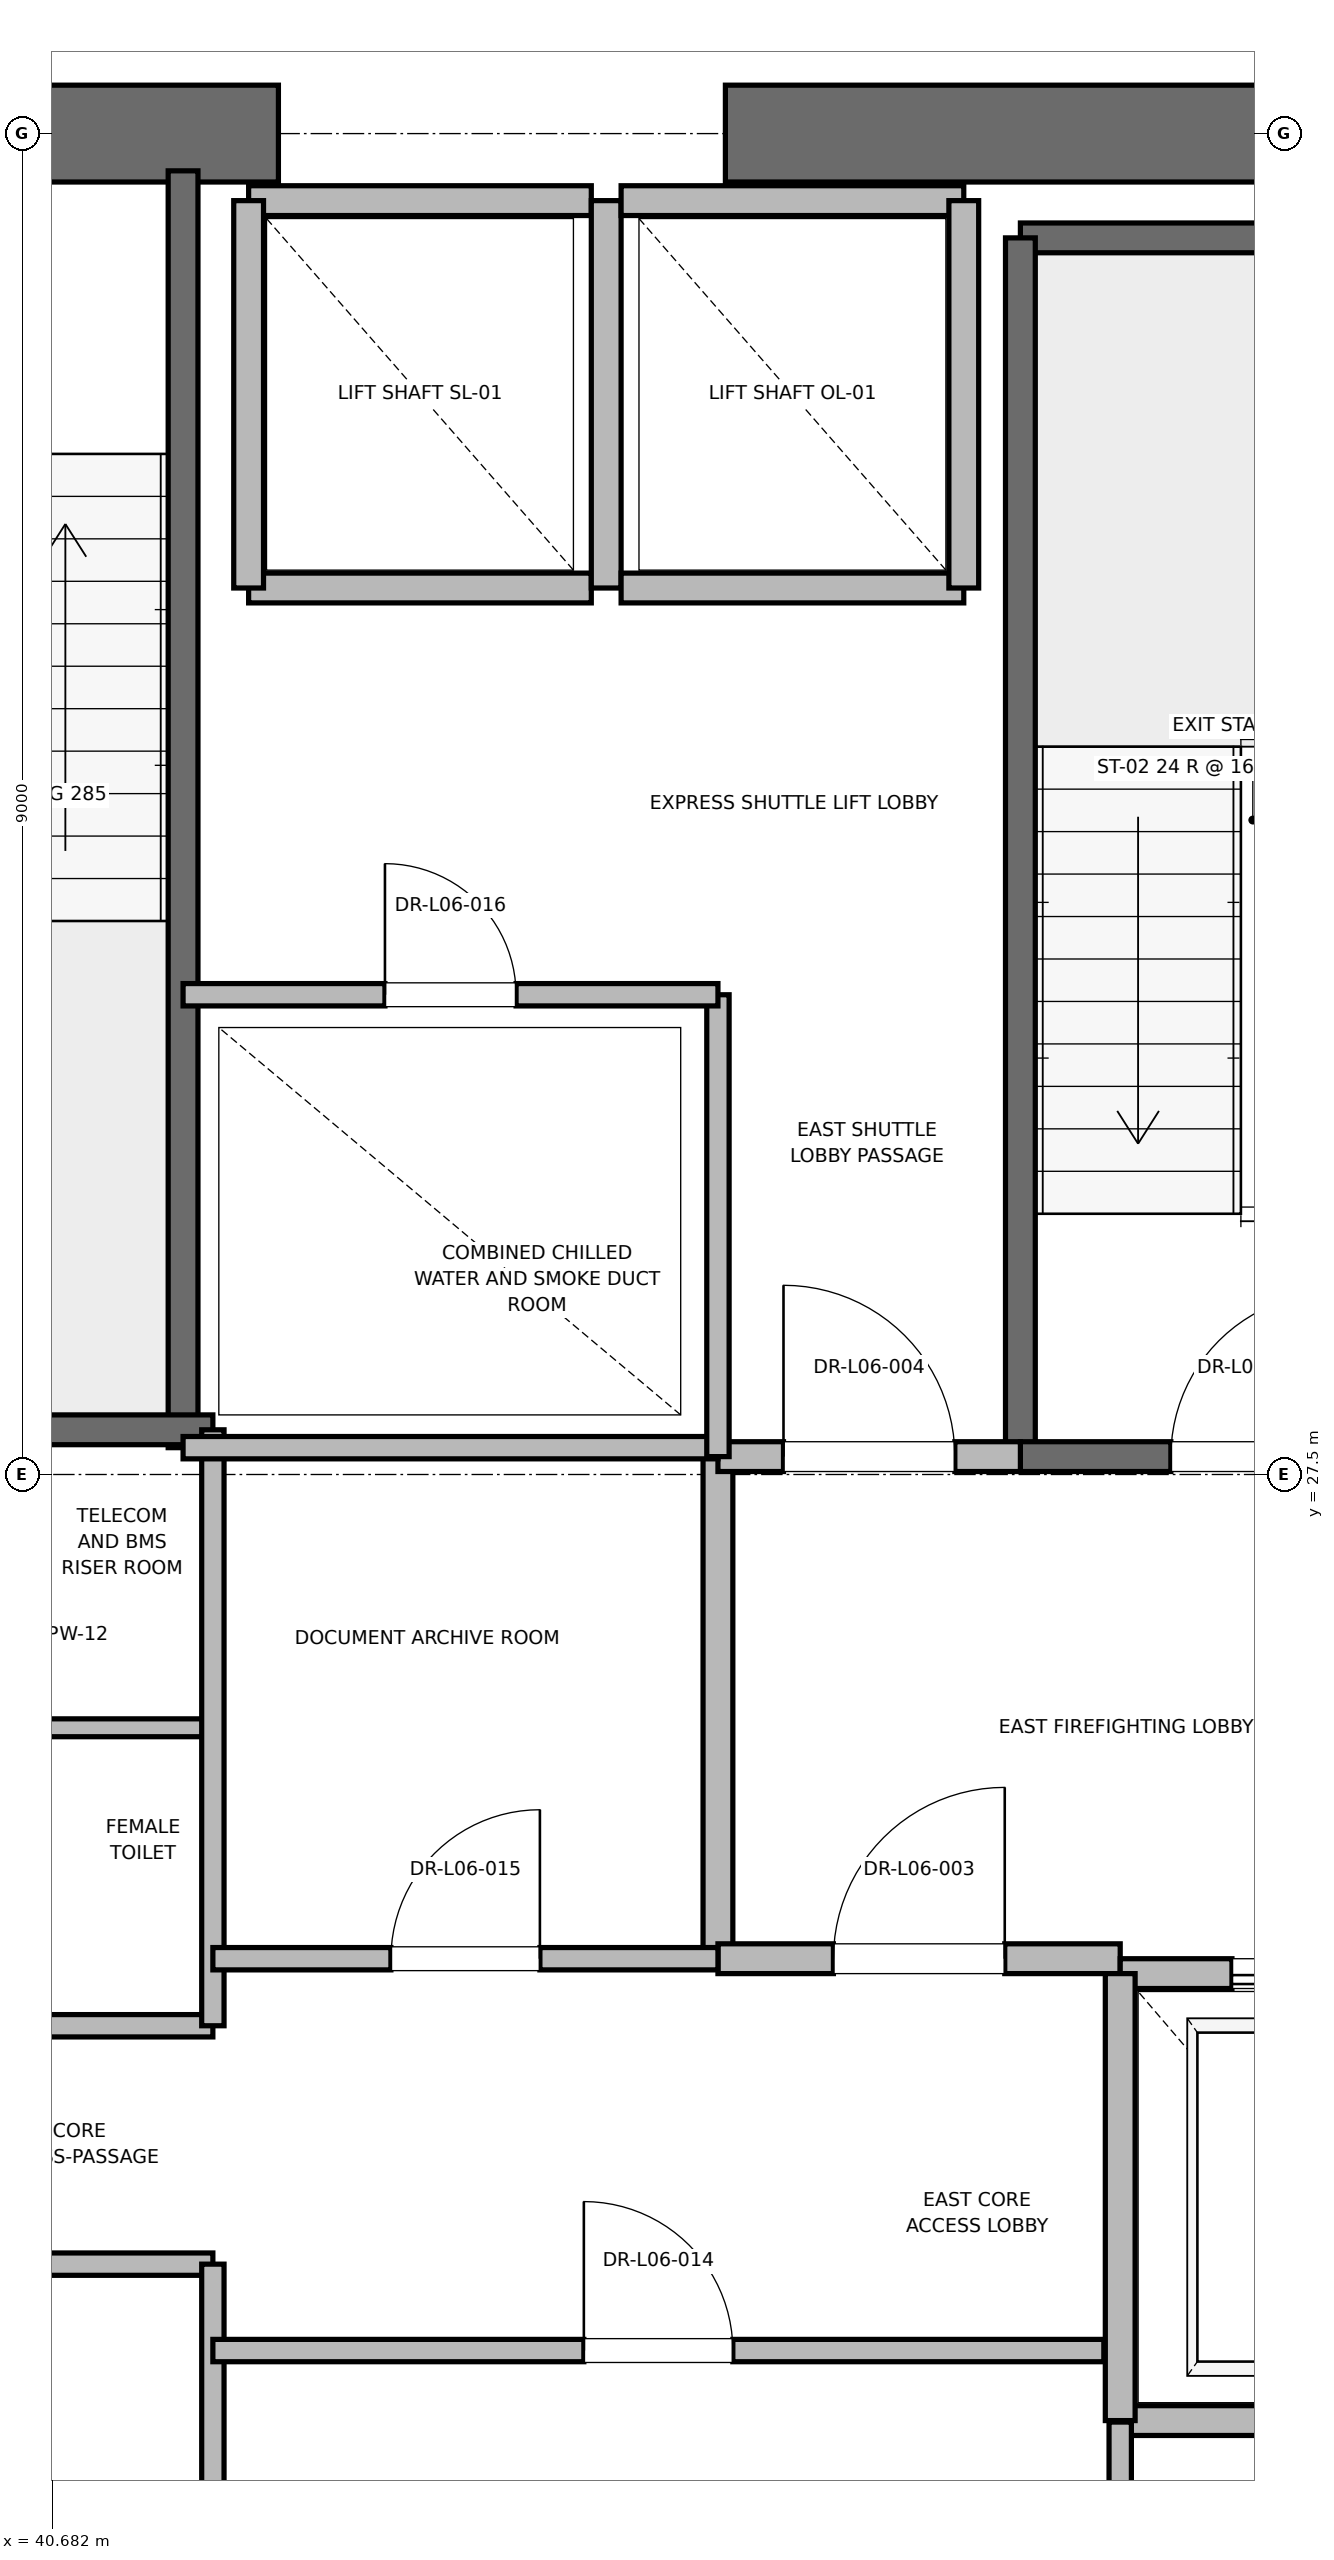
"""IFC4 building model, lengths in metres.
Left out: names, types, materials, properties, quantities, classifications, styles, units other than length and angle.
Written with IfcOpenShell. Run it as: python <this file> out.ifc"""

import sys

from ifc_helpers import new_model, si_unit, direction, frame, frame_2d, origin, place, context, subcontext, project, spatial, rectangle, extrude, element, fill, save


model = new_model("IFC4")
c1 = context("Model", 3, precision=1e-05, world=origin(), true_north=direction((0.0, 1.0)))
c2 = subcontext(c1, "Body", "Model", "MODEL_VIEW")
j1 = project(units=[si_unit("LENGTHUNIT", "METRE"), si_unit("PLANEANGLEUNIT", "RADIAN")], contexts=[c1])
p1 = place(None, origin())
s1 = spatial("IfcSite", under=j1, at=p1, CompositionType="ELEMENT")
p2 = place(p1, origin())
s2 = spatial("IfcBuilding", under=s1, at=p2, CompositionType="ELEMENT")
p3 = place(p2, frame((0.0, 0.0, 31.6)))
s3 = spatial("IfcBuildingStorey", under=s2, at=p3, CompositionType="ELEMENT", Elevation=31.6)
p4 = place(p3, frame((37.8, 36.5, 0.0), z_axis=(0.0, 0.0, 1.0), x_axis=(1.0, 0.0, 0.0)))
e1 = element("IfcWall", 1, at=p4, inside=s3, PredefinedType="SHEAR", context=c2, shape_type="SweptSolid", body=[
    extrude(rectangle(XDim=4.4, YDim=0.65, at=frame_2d((2.2, 0.0))), origin(), (0.0, 0.0, 1.0), 3.76),
])
p5 = place(p4, frame((1.65, 0.0, 0.0)))
e2 = element("IfcOpeningElement", 2, at=p5, cuts=e1, PredefinedType="OPENING", context=c2, shape_type="SweptSolid", body=[
    extrude(rectangle(XDim=1.1, YDim=2.15, at=frame_2d((0.55, 1.075))), frame((0.0, 0.325, 0.0), z_axis=(0.0, -1.0, 0.0), x_axis=(1.0, 0.0, 0.0)), (0.0, 0.0, 1.0), 0.65),
])
p6 = place(p3, frame((45.2, 36.5, 0.0), z_axis=(0.0, 0.0, 1.0), x_axis=(1.0, 0.0, 0.0)))
e3 = element("IfcWall", 3, at=p6, inside=s3, PredefinedType="SHEAR", context=c2, shape_type="SweptSolid", body=[
    extrude(rectangle(XDim=5.8, YDim=0.65, at=frame_2d((2.9, 0.0))), origin(), (0.0, 0.0, 1.0), 3.76),
])
p7 = place(p3, frame((47.18, 35.8, 0.0), z_axis=(0.0, 0.0, 1.0), x_axis=(1.0, 0.0, 0.0)))
e4 = element("IfcWall", 4, at=p7, inside=s3, PredefinedType="SOLIDWALL", context=c2, shape_type="SweptSolid", body=[
    extrude(rectangle(XDim=3.12, YDim=0.2, at=frame_2d((1.56, 0.0))), origin(), (0.0, 0.0, 1.0), 3.76),
])
p8 = place(p3, frame((47.18, 27.62, 0.0), z_axis=(0.0, 0.0, 1.0), x_axis=(0.0, 1.0, 0.0)))
e5 = element("IfcWall", 5, at=p8, inside=s3, PredefinedType="SOLIDWALL", context=c2, shape_type="SweptSolid", body=[
    extrude(rectangle(XDim=8.18, YDim=0.2, at=frame_2d((4.09, 0.0))), origin(), (0.0, 0.0, 1.0), 3.76),
])
p9 = place(p3, frame((47.18, 27.62, 0.0), z_axis=(0.0, 0.0, 1.0), x_axis=(1.0, 0.0, 0.0)))
e6 = element("IfcWall", 6, at=p9, inside=s3, PredefinedType="SOLIDWALL", context=c2, shape_type="SweptSolid", body=[
    extrude(rectangle(XDim=3.12, YDim=0.2, at=frame_2d((1.56, 0.0))), origin(), (0.0, 0.0, 1.0), 3.76),
])
p10 = place(p9, frame((1.01, 0.0, 0.0)))
e7 = element("IfcOpeningElement", 7, at=p10, cuts=e6, PredefinedType="OPENING", context=c2, shape_type="SweptSolid", body=[
    extrude(rectangle(XDim=1.1, YDim=2.15, at=frame_2d((0.55, 1.075))), frame((0.0, 0.1, 0.0), z_axis=(0.0, -1.0, 0.0), x_axis=(1.0, 0.0, 0.0)), (0.0, 0.0, 1.0), 0.2),
])
p11 = place(p3, frame((41.56, 27.68, 0.0), z_axis=(0.0, 0.0, 1.0), x_axis=(0.0, 1.0, 0.0)))
e8 = element("IfcWall", 8, at=p11, inside=s3, PredefinedType="SOLIDWALL", context=c2, shape_type="SweptSolid", body=[
    extrude(rectangle(XDim=8.57, YDim=0.2, at=frame_2d((4.285, 0.0))), origin(), (0.0, 0.0, 1.0), 3.76),
])
p12 = place(p3, frame((38.44, 27.8, 0.0), z_axis=(0.0, 0.0, 1.0), x_axis=(1.0, 0.0, 0.0)))
e9 = element("IfcWall", 9, at=p12, inside=s3, PredefinedType="SOLIDWALL", context=c2, shape_type="SweptSolid", body=[
    extrude(rectangle(XDim=3.32, YDim=0.2, at=frame_2d((1.66, 0.0))), origin(), (0.0, 0.0, 1.0), 3.76),
])
p13 = place(p3, frame((45.15, 24.25, 0.0), z_axis=(0.0, 0.0, 1.0), x_axis=(0.0, 1.0, 0.0)))
e10 = element("IfcWall", 10, at=p13, inside=s3, PredefinedType="PARTITIONING", context=c2, shape_type="SweptSolid", body=[
    extrude(rectangle(XDim=3.37, YDim=0.2, at=frame_2d((1.685, 0.0))), origin(), (0.0, 0.0, 1.0), 3.76),
])
p14 = place(p3, frame((45.15, 24.25, 0.0), z_axis=(0.0, 0.0, 1.0), x_axis=(1.0, 0.0, 0.0)))
e11 = element("IfcWall", 11, at=p14, inside=s3, PredefinedType="PARTITIONING", context=c2, shape_type="SweptSolid", body=[
    extrude(rectangle(XDim=2.7, YDim=0.2, at=frame_2d((1.35, 0.0))), origin(), (0.0, 0.0, 1.0), 3.76),
])
p15 = place(p14, frame((0.775, 0.0, 0.0)))
e12 = element("IfcOpeningElement", 12, at=p15, cuts=e11, PredefinedType="OPENING", context=c2, shape_type="SweptSolid", body=[
    extrude(rectangle(XDim=1.15, YDim=2.2, at=frame_2d((0.575, 1.1))), frame((0.0, 0.1, 0.0), z_axis=(0.0, -1.0, 0.0), x_axis=(1.0, 0.0, 0.0)), (0.0, 0.0, 1.0), 0.2),
])
p16 = place(p3, frame((45.15, 27.62, 0.0), z_axis=(0.0, 0.0, 1.0), x_axis=(1.0, 0.0, 0.0)))
e13 = element("IfcWall", 13, at=p16, inside=s3, PredefinedType="PARTITIONING", context=c2, shape_type="SweptSolid", body=[
    extrude(rectangle(XDim=2.03, YDim=0.2, at=frame_2d((1.015, 0.0))), origin(), (0.0, 0.0, 1.0), 3.76),
])
p17 = place(p16, frame((0.44, 0.0, 0.0)))
e14 = element("IfcOpeningElement", 14, at=p17, cuts=e13, PredefinedType="OPENING", context=c2, shape_type="SweptSolid", body=[
    extrude(rectangle(XDim=1.15, YDim=2.2, at=frame_2d((0.575, 1.1))), frame((0.0, 0.1, 0.0), z_axis=(0.0, -1.0, 0.0), x_axis=(1.0, 0.0, 0.0)), (0.0, 0.0, 1.0), 0.2),
])
p18 = place(p3, frame((47.85, 21.15, 0.0), z_axis=(0.0, 0.0, 1.0), x_axis=(1.0, 0.0, 0.0)))
e15 = element("IfcWall", 15, at=p18, inside=s3, PredefinedType="SOLIDWALL", context=c2, shape_type="SweptSolid", body=[
    extrude(rectangle(XDim=2.6, YDim=0.2, at=frame_2d((1.3, 0.0))), origin(), (0.0, 0.0, 1.0), 3.76),
])
p19 = place(p3, frame((50.45, 24.15, 0.0), z_axis=(0.0, 0.0, 1.0), x_axis=(-1.0, 0.0, 0.0)))
e16 = element("IfcWall", 16, at=p19, inside=s3, PredefinedType="SOLIDWALL", context=c2, shape_type="SweptSolid", body=[
    extrude(rectangle(XDim=2.6, YDim=0.2, at=frame_2d((1.3, 0.0))), origin(), (0.0, 0.0, 1.0), 2.54),
])
p20 = place(p19, frame((0.75, 0.0, 0.0)))
e17 = element("IfcOpeningElement", 17, at=p20, cuts=e16, PredefinedType="OPENING", context=c2, shape_type="SweptSolid", body=[
    extrude(rectangle(XDim=1.1, YDim=2.2, at=frame_2d((0.55, 1.1))), frame((0.0, 0.1, 0.0), z_axis=(0.0, -1.0, 0.0), x_axis=(1.0, 0.0, 0.0)), (0.0, 0.0, 1.0), 0.2),
])
p21 = place(p3, frame((47.85, 24.15, 0.0), z_axis=(0.0, 0.0, 1.0), x_axis=(0.0, -1.0, 0.0)))
e18 = element("IfcWall", 18, at=p21, inside=s3, PredefinedType="SOLIDWALL", context=c2, shape_type="SweptSolid", body=[
    extrude(rectangle(XDim=3.0, YDim=0.2, at=frame_2d((1.5, 0.0))), origin(), (0.0, 0.0, 1.0), 3.76),
])
p22 = place(p3, frame((42.0, 33.45, 0.0), z_axis=(0.0, 0.0, 1.0), x_axis=(1.0, 0.0, 0.0)))
e19 = element("IfcWall", 19, at=p22, inside=s3, PredefinedType="SOLIDWALL", context=c2, shape_type="SweptSolid", body=[
    extrude(rectangle(XDim=2.3, YDim=0.2, at=frame_2d((1.15, 0.0))), origin(), (0.0, 0.0, 1.0), 3.76),
])
p23 = place(p3, frame((44.3, 36.05, 0.0), z_axis=(0.0, 0.0, 1.0), x_axis=(-1.0, 0.0, 0.0)))
e20 = element("IfcWall", 20, at=p23, inside=s3, PredefinedType="SOLIDWALL", context=c2, shape_type="SweptSolid", body=[
    extrude(rectangle(XDim=2.3, YDim=0.2, at=frame_2d((1.15, 0.0))), origin(), (0.0, 0.0, 1.0), 2.54),
])
for number, where, z_axis, x_axis in (
    (21, (42.0, 36.05, 0.0), (0.0, 0.0, 1.0), (0.0, -1.0, 0.0)),
    (22, (44.4, 33.45, 0.0), (0.0, 0.0, 1.0), (0.0, 1.0, 0.0)),
):
    element("IfcWall", number, at=place(p3, frame(where, z_axis=z_axis, x_axis=x_axis)), inside=s3, PredefinedType="SOLIDWALL", context=c2, shape_type="SweptSolid", body=[
        extrude(rectangle(XDim=2.6, YDim=0.2, at=frame_2d((1.3, 0.0))), origin(), (0.0, 0.0, 1.0), 2.54),
    ])
p24 = place(p3, frame((44.5, 33.45, 0.0), z_axis=(0.0, 0.0, 1.0), x_axis=(1.0, 0.0, 0.0)))
e23 = element("IfcWall", 23, at=p24, inside=s3, PredefinedType="SOLIDWALL", context=c2, shape_type="SweptSolid", body=[
    extrude(rectangle(XDim=2.3, YDim=0.2, at=frame_2d((1.15, 0.0))), origin(), (0.0, 0.0, 1.0), 3.76),
])
p25 = place(p3, frame((46.8, 36.05, 0.0), z_axis=(0.0, 0.0, 1.0), x_axis=(-1.0, 0.0, 0.0)))
e24 = element("IfcWall", 24, at=p25, inside=s3, PredefinedType="SOLIDWALL", context=c2, shape_type="SweptSolid", body=[
    extrude(rectangle(XDim=2.3, YDim=0.2, at=frame_2d((1.15, 0.0))), origin(), (0.0, 0.0, 1.0), 2.54),
])
p26 = place(p3, frame((46.8, 33.45, 0.0), z_axis=(0.0, 0.0, 1.0), x_axis=(0.0, 1.0, 0.0)))
e25 = element("IfcWall", 25, at=p26, inside=s3, PredefinedType="SOLIDWALL", context=c2, shape_type="SweptSolid", body=[
    extrude(rectangle(XDim=2.6, YDim=0.2, at=frame_2d((1.3, 0.0))), origin(), (0.0, 0.0, 1.0), 3.76),
])
for number, where, z_axis, x_axis in (
    (26, (39.95, 22.2, 0.0), (0.0, 0.0, 1.0), (1.0, 0.0, 0.0)),
    (27, (39.95, 23.8, 0.0), (0.0, 0.0, 1.0), (1.0, 0.0, 0.0)),
):
    element("IfcWall", number, at=place(p3, frame(where, z_axis=z_axis, x_axis=x_axis)), inside=s3, PredefinedType="PARTITIONING", context=c2, shape_type="SweptSolid", body=[
        extrude(rectangle(XDim=1.81, YDim=0.15, at=frame_2d((0.905, 0.0))), origin(), (0.0, 0.0, 1.0), 2.85),
    ])
p27 = place(p3, frame((39.95, 25.8, 0.0), z_axis=(0.0, 0.0, 1.0), x_axis=(1.0, 0.0, 0.0)))
e28 = element("IfcWall", 28, at=p27, inside=s3, PredefinedType="PARTITIONING", context=c2, shape_type="SweptSolid", body=[
    extrude(rectangle(XDim=1.81, YDim=0.12, at=frame_2d((0.905, 0.0))), origin(), (0.0, 0.0, 1.0), 2.85),
])
p28 = place(p3, frame((41.76, 18.6, 0.0), z_axis=(0.0, 0.0, 1.0), x_axis=(0.0, 1.0, 0.0)))
e29 = element("IfcWall", 29, at=p28, inside=s3, PredefinedType="PARTITIONING", context=c2, shape_type="SweptSolid", body=[
    extrude(rectangle(XDim=3.6, YDim=0.15, at=frame_2d((1.8, 0.0))), origin(), (0.0, 0.0, 1.0), 2.54),
])
p29 = place(p3, frame((41.76, 23.8, 0.0), z_axis=(0.0, 0.0, 1.0), x_axis=(0.0, 1.0, 0.0)))
e30 = element("IfcWall", 30, at=p29, inside=s3, PredefinedType="PARTITIONING", context=c2, shape_type="SweptSolid", body=[
    extrude(rectangle(XDim=4.0, YDim=0.15, at=frame_2d((2.0, 0.0))), origin(), (0.0, 0.0, 1.0), 2.85),
])
p30 = place(p3, frame((41.56, 27.68, 0.0), z_axis=(0.0, 0.0, 1.0), x_axis=(1.0, 0.0, 0.0)))
e31 = element("IfcWall", 31, at=p30, inside=s3, PredefinedType="PARTITIONING", context=c2, shape_type="SweptSolid", body=[
    extrude(rectangle(XDim=3.59, YDim=0.15, at=frame_2d((1.795, 0.0))), origin(), (0.0, 0.0, 1.0), 2.85),
])
p31 = place(p3, frame((47.85, 18.6, 0.0), z_axis=(0.0, 0.0, 1.0), x_axis=(0.0, 1.0, 0.0)))
e32 = element("IfcWall", 32, at=p31, inside=s3, PredefinedType="PARTITIONING", context=c2, shape_type="SweptSolid", body=[
    extrude(rectangle(XDim=2.54, YDim=0.15, at=frame_2d((1.27, 0.0))), origin(), (0.0, 0.0, 1.0), 2.85),
])
p32 = place(p3, frame((41.76, 21.62, 0.0), z_axis=(0.0, 0.0, 1.0), x_axis=(1.0, 0.0, 0.0)))
e33 = element("IfcWall", 33, at=p32, inside=s3, PredefinedType="PARTITIONING", context=c2, shape_type="SweptSolid", body=[
    extrude(rectangle(XDim=5.98, YDim=0.15, at=frame_2d((2.99, 0.0))), origin(), (0.0, 0.0, 1.0), 2.85),
])
p33 = place(p32, frame((2.49, 0.0, 0.0)))
e34 = element("IfcOpeningElement", 34, at=p33, cuts=e33, PredefinedType="OPENING", context=c2, shape_type="SweptSolid", body=[
    extrude(rectangle(XDim=1.0, YDim=2.15, at=frame_2d((0.5, 1.075))), frame((0.0, 0.075, 0.0), z_axis=(0.0, -1.0, 0.0), x_axis=(1.0, 0.0, 0.0)), (0.0, 0.0, 1.0), 0.15),
])
p34 = place(p3, frame((41.76, 24.25, 0.0), z_axis=(0.0, 0.0, 1.0), x_axis=(1.0, 0.0, 0.0)))
e35 = element("IfcWall", 35, at=p34, inside=s3, PredefinedType="PARTITIONING", context=c2, shape_type="SweptSolid", body=[
    extrude(rectangle(XDim=3.39, YDim=0.15, at=frame_2d((1.695, 0.0))), origin(), (0.0, 0.0, 1.0), 2.85),
])
p35 = place(p34, frame((1.195, 0.0, 0.0)))
e36 = element("IfcOpeningElement", 36, at=p35, cuts=e35, PredefinedType="OPENING", context=c2, shape_type="SweptSolid", body=[
    extrude(rectangle(XDim=1.0, YDim=2.15, at=frame_2d((0.5, 1.075))), frame((0.0, 0.075, 0.0), z_axis=(0.0, -1.0, 0.0), x_axis=(1.0, 0.0, 0.0)), (0.0, 0.0, 1.0), 0.15),
])
p36 = place(p3, frame((45.15, 27.62, 0.0), z_axis=(0.0, 0.0, 1.0), x_axis=(0.0, 1.0, 0.0)))
e37 = element("IfcWall", 37, at=p36, inside=s3, PredefinedType="PARTITIONING", context=c2, shape_type="SweptSolid", body=[
    extrude(rectangle(XDim=3.1, YDim=0.15, at=frame_2d((1.55, 0.0))), origin(), (0.0, 0.0, 1.0), 2.85),
])
p37 = place(p3, frame((41.56, 30.72, 0.0), z_axis=(0.0, 0.0, 1.0), x_axis=(1.0, 0.0, 0.0)))
e38 = element("IfcWall", 38, at=p37, inside=s3, PredefinedType="PARTITIONING", context=c2, shape_type="SweptSolid", body=[
    extrude(rectangle(XDim=3.59, YDim=0.15, at=frame_2d((1.795, 0.0))), origin(), (0.0, 0.0, 1.0), 2.85),
])
p38 = place(p37, frame((1.355, 0.0, 0.0)))
e39 = element("IfcOpeningElement", 39, at=p38, cuts=e38, PredefinedType="OPENING", context=c2, shape_type="SweptSolid", body=[
    extrude(rectangle(XDim=0.88, YDim=2.1, at=frame_2d((0.44, 1.05))), frame((0.0, 0.075, 0.0), z_axis=(0.0, -1.0, 0.0), x_axis=(1.0, 0.0, 0.0)), (0.0, 0.0, 1.0), 0.15),
])
p39 = place(p10, origin())
e40 = element("IfcDoor", 40, at=p39, inside=s3, OperationType="SINGLE_SWING_RIGHT", PredefinedType="DOOR", context=c2, shape_type="SweptSolid", body=[
    extrude(rectangle(XDim=1.1, YDim=2.15, at=frame_2d((0.55, 1.075))), frame((0.0, 0.025, 0.0), z_axis=(0.0, -1.0, 0.0), x_axis=(1.0, 0.0, 0.0)), (0.0, 0.0, 1.0), 0.05),
])
fill(e7, e40)
p40 = place(p15, origin())
e41 = element("IfcDoor", 41, at=p40, inside=s3, OperationType="SINGLE_SWING_RIGHT", PredefinedType="DOOR", context=c2, shape_type="SweptSolid", body=[
    extrude(rectangle(XDim=1.15, YDim=2.2, at=frame_2d((0.575, 1.1))), frame((0.0, 0.025, 0.0), z_axis=(0.0, -1.0, 0.0), x_axis=(1.0, 0.0, 0.0)), (0.0, 0.0, 1.0), 0.05),
])
fill(e12, e41)
p41 = place(p17, origin())
e42 = element("IfcDoor", 42, at=p41, inside=s3, OperationType="SINGLE_SWING_LEFT", PredefinedType="DOOR", context=c2, shape_type="SweptSolid", body=[
    extrude(rectangle(XDim=1.15, YDim=2.2, at=frame_2d((0.575, 1.1))), frame((0.0, 0.025, 0.0), z_axis=(0.0, -1.0, 0.0), x_axis=(1.0, 0.0, 0.0)), (0.0, 0.0, 1.0), 0.05),
])
fill(e14, e42)
p42 = place(p20, origin())
e43 = element("IfcDoor", 43, at=p42, inside=s3, OperationType="SLIDING_TO_RIGHT", PredefinedType="DOOR", context=c2, shape_type="SweptSolid", body=[
    extrude(rectangle(XDim=1.1, YDim=2.2, at=frame_2d((0.55, 1.1))), frame((0.0, 0.025, 0.0), z_axis=(0.0, -1.0, 0.0), x_axis=(1.0, 0.0, 0.0)), (0.0, 0.0, 1.0), 0.05),
])
fill(e17, e43)
p43 = place(p33, origin())
e44 = element("IfcDoor", 44, at=p43, inside=s3, OperationType="SINGLE_SWING_LEFT", PredefinedType="DOOR", context=c2, shape_type="SweptSolid", body=[
    extrude(rectangle(XDim=1.0, YDim=2.15, at=frame_2d((0.5, 1.075))), frame((0.0, 0.025, 0.0), z_axis=(0.0, -1.0, 0.0), x_axis=(1.0, 0.0, 0.0)), (0.0, 0.0, 1.0), 0.05),
])
fill(e34, e44)
p44 = place(p35, origin())
e45 = element("IfcDoor", 45, at=p44, inside=s3, OperationType="SINGLE_SWING_RIGHT", PredefinedType="DOOR", context=c2, shape_type="SweptSolid", body=[
    extrude(rectangle(XDim=1.0, YDim=2.15, at=frame_2d((0.5, 1.075))), frame((0.0, 0.025, 0.0), z_axis=(0.0, -1.0, 0.0), x_axis=(1.0, 0.0, 0.0)), (0.0, 0.0, 1.0), 0.05),
])
fill(e36, e45)
p45 = place(p38, origin())
e46 = element("IfcDoor", 46, at=p45, inside=s3, OperationType="SINGLE_SWING_LEFT", PredefinedType="DOOR", context=c2, shape_type="SweptSolid", body=[
    extrude(rectangle(XDim=0.88, YDim=2.1, at=frame_2d((0.44, 1.05))), frame((0.0, 0.025, 0.0), z_axis=(0.0, -1.0, 0.0), x_axis=(1.0, 0.0, 0.0)), (0.0, 0.0, 1.0), 0.05),
])
fill(e39, e46)
save(model, sys.argv[1])
